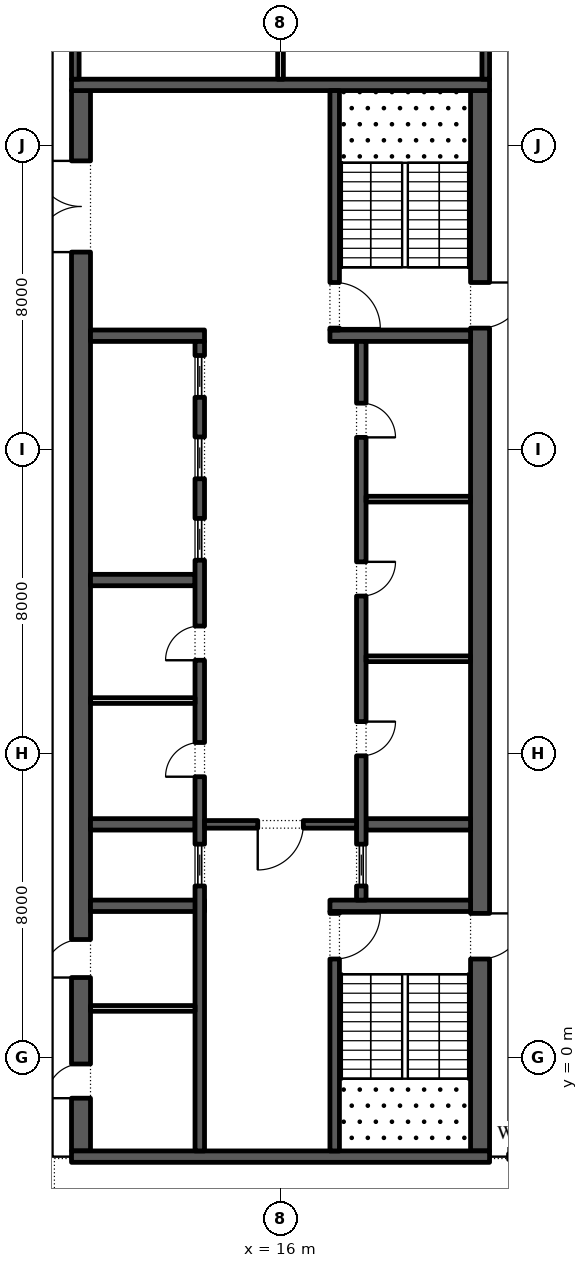
"""IFC4 building model, lengths in metres.
Left out: names, types, materials, properties, quantities, classifications, styles, units other than length and angle.
Written with IfcOpenShell. Run it as: python <this file> out.ifc"""

import sys

from ifc_helpers import new_model, si_unit, direction, frame, frame_2d, origin, place, context, subcontext, project, spatial, rectangle, extrude, element, fill, save


model = new_model("IFC4")
c1 = context("Model", 3, precision=1e-05, world=origin(), true_north=direction((0.0, 1.0)))
c2 = subcontext(c1, "Body", "Model", "MODEL_VIEW")
j1 = project(units=[si_unit("LENGTHUNIT", "METRE"), si_unit("PLANEANGLEUNIT", "RADIAN")], contexts=[c1])
p1 = place(None, origin())
s1 = spatial("IfcSite", under=j1, at=p1, CompositionType="ELEMENT")
p2 = place(p1, origin())
s2 = spatial("IfcBuilding", under=s1, at=p2, CompositionType="ELEMENT")
p3 = place(p2, frame((0.0, 0.0, 359.4)))
s3 = spatial("IfcBuildingStorey", under=s2, at=p3, CompositionType="ELEMENT", Elevation=359.4)
p4 = place(p3, frame((21.25, -2.45, 0.0), z_axis=(0.0, 0.0, 1.0), x_axis=(0.0, 1.0, 0.0)))
e1 = element("IfcWall", 1, at=p4, inside=s3, PredefinedType="SHEAR", context=c2, shape_type="SweptSolid", body=[
    extrude(rectangle(XDim=27.9, YDim=0.5, at=frame_2d((13.95, 0.0))), origin(), (0.0, 0.0, 1.0), 3.9),
])
p5 = place(p4, frame((5.05, 0.0, 0.0)))
e2 = element("IfcOpeningElement", 2, at=p5, cuts=e1, PredefinedType="OPENING", context=c2, shape_type="SweptSolid", body=[
    extrude(rectangle(XDim=1.2, YDim=2.1, at=frame_2d((0.6, 1.05))), frame((0.0, 0.26, 0.0), z_axis=(0.0, -1.0, 0.0), x_axis=(1.0, 0.0, 0.0)), (0.0, 0.0, 1.0), 0.52),
])
p6 = place(p4, frame((21.65, 0.0, 0.0)))
e3 = element("IfcOpeningElement", 3, at=p6, cuts=e1, PredefinedType="OPENING", context=c2, shape_type="SweptSolid", body=[
    extrude(rectangle(XDim=1.2, YDim=2.1, at=frame_2d((0.6, 1.05))), frame((0.0, 0.26, 0.0), z_axis=(0.0, -1.0, 0.0), x_axis=(1.0, 0.0, 0.0)), (0.0, 0.0, 1.0), 0.52),
])
p7 = place(p3, frame((10.75, -2.45, 0.0), z_axis=(0.0, 0.0, 1.0), x_axis=(0.0, 1.0, 0.0)))
e4 = element("IfcWall", 4, at=p7, inside=s3, PredefinedType="SHEAR", context=c2, shape_type="SweptSolid", body=[
    extrude(rectangle(XDim=27.9, YDim=0.5, at=frame_2d((13.95, 0.0))), origin(), (0.0, 0.0, 1.0), 3.9),
])
p8 = place(p7, frame((23.65, 0.0, 0.0)))
e5 = element("IfcOpeningElement", 5, at=p8, cuts=e4, PredefinedType="OPENING", context=c2, shape_type="SweptSolid", body=[
    extrude(rectangle(XDim=2.4, YDim=2.1, at=frame_2d((1.2, 1.05))), frame((0.0, 0.26, 0.0), z_axis=(0.0, -1.0, 0.0), x_axis=(1.0, 0.0, 0.0)), (0.0, 0.0, 1.0), 0.52),
])
p9 = place(p7, frame((1.387, 0.0, 0.0)))
e6 = element("IfcOpeningElement", 6, at=p9, cuts=e4, PredefinedType="OPENING", context=c2, shape_type="SweptSolid", body=[
    extrude(rectangle(XDim=0.9, YDim=2.1, at=frame_2d((0.45, 1.05))), frame((0.0, 0.26, 0.0), z_axis=(0.0, -1.0, 0.0), x_axis=(1.0, 0.0, 0.0)), (0.0, 0.0, 1.0), 0.52),
])
p10 = place(p7, frame((4.562, 0.0, 0.0)))
e7 = element("IfcOpeningElement", 7, at=p10, cuts=e4, PredefinedType="OPENING", context=c2, shape_type="SweptSolid", body=[
    extrude(rectangle(XDim=1.0, YDim=2.1, at=frame_2d((0.5, 1.05))), frame((0.0, 0.26, 0.0), z_axis=(0.0, -1.0, 0.0), x_axis=(1.0, 0.0, 0.0)), (0.0, 0.0, 1.0), 0.52),
])
for number, where, z_axis, x_axis in (
    (8, (10.5, -2.6, 0.0), (0.0, 0.0, 1.0), (1.0, 0.0, 0.0)),
    (9, (10.5, 25.6, 0.0), (0.0, 0.0, 1.0), (1.0, 0.0, 0.0)),
):
    element("IfcWall", number, at=place(p3, frame(where, z_axis=z_axis, x_axis=x_axis)), inside=s3, PredefinedType="SHEAR", context=c2, shape_type="SweptSolid", body=[
        extrude(rectangle(XDim=11.0, YDim=0.3, at=frame_2d((5.5, 0.0))), origin(), (0.0, 0.0, 1.0), 3.9),
    ])
p11 = place(p3, frame((17.3, 4.0, 0.0), z_axis=(0.0, 0.0, 1.0), x_axis=(1.0, 0.0, 0.0)))
e10 = element("IfcWall", 10, at=p11, inside=s3, PredefinedType="SHEAR", context=c2, shape_type="SweptSolid", body=[
    extrude(rectangle(XDim=3.7, YDim=0.3, at=frame_2d((1.85, 0.0))), origin(), (0.0, 0.0, 1.0), 3.9),
])
p12 = place(p3, frame((17.425, -2.45, 0.0), z_axis=(0.0, 0.0, 1.0), x_axis=(0.0, 1.0, 0.0)))
e11 = element("IfcWall", 11, at=p12, inside=s3, PredefinedType="SHEAR", context=c2, shape_type="SweptSolid", body=[
    extrude(rectangle(XDim=6.3, YDim=0.25, at=frame_2d((3.15, 0.0))), origin(), (0.0, 0.0, 1.0), 3.9),
])
p13 = place(p12, frame((5.05, 0.0, 0.0)))
e12 = element("IfcOpeningElement", 12, at=p13, cuts=e11, PredefinedType="OPENING", context=c2, shape_type="SweptSolid", body=[
    extrude(rectangle(XDim=1.2, YDim=2.1, at=frame_2d((0.6, 1.05))), frame((0.0, 0.135, 0.0), z_axis=(0.0, -1.0, 0.0), x_axis=(1.0, 0.0, 0.0)), (0.0, 0.0, 1.0), 0.27),
])
p14 = place(p3, frame((17.3, 19.0, 0.0), z_axis=(0.0, 0.0, 1.0), x_axis=(1.0, 0.0, 0.0)))
e13 = element("IfcWall", 13, at=p14, inside=s3, PredefinedType="SHEAR", context=c2, shape_type="SweptSolid", body=[
    extrude(rectangle(XDim=3.7, YDim=0.3, at=frame_2d((1.85, 0.0))), origin(), (0.0, 0.0, 1.0), 3.9),
])
p15 = place(p3, frame((17.425, 19.15, 0.0), z_axis=(0.0, 0.0, 1.0), x_axis=(0.0, 1.0, 0.0)))
e14 = element("IfcWall", 14, at=p15, inside=s3, PredefinedType="SHEAR", context=c2, shape_type="SweptSolid", body=[
    extrude(rectangle(XDim=6.3, YDim=0.25, at=frame_2d((3.15, 0.0))), origin(), (0.0, 0.0, 1.0), 3.9),
])
p16 = place(p15, frame((0.05, 0.0, 0.0)))
e15 = element("IfcOpeningElement", 15, at=p16, cuts=e14, PredefinedType="OPENING", context=c2, shape_type="SweptSolid", body=[
    extrude(rectangle(XDim=1.2, YDim=2.1, at=frame_2d((0.6, 1.05))), frame((0.0, 0.135, 0.0), z_axis=(0.0, -1.0, 0.0), x_axis=(1.0, 0.0, 0.0)), (0.0, 0.0, 1.0), 0.27),
])
p17 = place(p3, frame((18.25, 6.143, 0.0), z_axis=(0.0, 0.0, 1.0), x_axis=(1.0, 0.0, 0.0)))
e16 = element("IfcWall", 16, at=p17, inside=s3, PredefinedType="SHEAR", context=c2, shape_type="SweptSolid", body=[
    extrude(rectangle(XDim=2.75, YDim=0.3, at=frame_2d((1.375, 0.0))), origin(), (0.0, 0.0, 1.0), 3.9),
])
p18 = place(p3, frame((18.125, 4.15, 0.0), z_axis=(0.0, 0.0, 1.0), x_axis=(0.0, 1.0, 0.0)))
e17 = element("IfcWall", 17, at=p18, inside=s3, PredefinedType="SHEAR", context=c2, shape_type="SweptSolid", body=[
    extrude(rectangle(XDim=14.7, YDim=0.25, at=frame_2d((7.35, 0.0))), origin(), (0.0, 0.0, 1.0), 3.9),
])
p19 = place(p18, frame((3.796, 0.0, 0.0)))
e18 = element("IfcOpeningElement", 18, at=p19, cuts=e17, PredefinedType="OPENING", context=c2, shape_type="SweptSolid", body=[
    extrude(rectangle(XDim=0.9, YDim=2.1, at=frame_2d((0.45, 1.05))), frame((0.0, 0.135, 0.0), z_axis=(0.0, -1.0, 0.0), x_axis=(1.0, 0.0, 0.0)), (0.0, 0.0, 1.0), 0.27),
])
p20 = place(p18, frame((8.0, 0.0, 0.0)))
e19 = element("IfcOpeningElement", 19, at=p20, cuts=e17, PredefinedType="OPENING", context=c2, shape_type="SweptSolid", body=[
    extrude(rectangle(XDim=0.9, YDim=2.1, at=frame_2d((0.45, 1.05))), frame((0.0, 0.135, 0.0), z_axis=(0.0, -1.0, 0.0), x_axis=(1.0, 0.0, 0.0)), (0.0, 0.0, 1.0), 0.27),
])
p21 = place(p18, frame((12.175, 0.0, 0.0)))
e20 = element("IfcOpeningElement", 20, at=p21, cuts=e17, PredefinedType="OPENING", context=c2, shape_type="SweptSolid", body=[
    extrude(rectangle(XDim=0.9, YDim=2.1, at=frame_2d((0.45, 1.05))), frame((0.0, 0.135, 0.0), z_axis=(0.0, -1.0, 0.0), x_axis=(1.0, 0.0, 0.0)), (0.0, 0.0, 1.0), 0.27),
])
p22 = place(p18, frame((0.371, 0.0, 0.0)))
e21 = element("IfcOpeningElement", 21, at=p22, cuts=e17, PredefinedType="OPENING", context=c2, shape_type="SweptSolid", body=[
    extrude(rectangle(XDim=1.1, YDim=2.1, at=frame_2d((0.55, 1.05))), frame((0.0, 0.135, 0.0), z_axis=(0.0, -1.0, 0.0), x_axis=(1.0, 0.0, 0.0)), (0.0, 0.0, 1.0), 0.27),
])
for number, where, z_axis, x_axis in (
    (22, (18.25, 10.5, 0.0), (0.0, 0.0, 1.0), (1.0, 0.0, 0.0)),
    (23, (18.25, 14.7, 0.0), (0.0, 0.0, 1.0), (1.0, 0.0, 0.0)),
):
    element("IfcWall", number, at=place(p3, frame(where, z_axis=z_axis, x_axis=x_axis)), inside=s3, PredefinedType="PARTITIONING", context=c2, shape_type="SweptSolid", body=[
        extrude(rectangle(XDim=2.75, YDim=0.15, at=frame_2d((1.375, 0.0))), origin(), (0.0, 0.0, 1.0), 3.9),
    ])
p23 = place(p3, frame((11.0, 4.0, 0.0), z_axis=(0.0, 0.0, 1.0), x_axis=(1.0, 0.0, 0.0)))
e24 = element("IfcWall", 24, at=p23, inside=s3, PredefinedType="SHEAR", context=c2, shape_type="SweptSolid", body=[
    extrude(rectangle(XDim=3.0, YDim=0.3, at=frame_2d((1.5, 0.0))), origin(), (0.0, 0.0, 1.0), 3.9),
])
for number, where, z_axis, x_axis in (
    (25, (11.0, 6.143, 0.0), (0.0, 0.0, 1.0), (1.0, 0.0, 0.0)),
    (26, (11.0, 12.571, 0.0), (0.0, 0.0, 1.0), (1.0, 0.0, 0.0)),
):
    element("IfcWall", number, at=place(p3, frame(where, z_axis=z_axis, x_axis=x_axis)), inside=s3, PredefinedType="SHEAR", context=c2, shape_type="SweptSolid", body=[
        extrude(rectangle(XDim=2.75, YDim=0.3, at=frame_2d((1.375, 0.0))), origin(), (0.0, 0.0, 1.0), 3.9),
    ])
p24 = place(p3, frame((11.0, 19.0, 0.0), z_axis=(0.0, 0.0, 1.0), x_axis=(1.0, 0.0, 0.0)))
e27 = element("IfcWall", 27, at=p24, inside=s3, PredefinedType="SHEAR", context=c2, shape_type="SweptSolid", body=[
    extrude(rectangle(XDim=3.0, YDim=0.3, at=frame_2d((1.5, 0.0))), origin(), (0.0, 0.0, 1.0), 3.9),
])
p25 = place(p3, frame((13.875, -2.45, 0.0), z_axis=(0.0, 0.0, 1.0), x_axis=(0.0, 1.0, 0.0)))
e28 = element("IfcWall", 28, at=p25, inside=s3, PredefinedType="SHEAR", context=c2, shape_type="SweptSolid", body=[
    extrude(rectangle(XDim=21.3, YDim=0.25, at=frame_2d((10.65, 0.0))), origin(), (0.0, 0.0, 1.0), 3.9),
])
p26 = place(p25, frame((9.846, 0.0, 0.0)))
e29 = element("IfcOpeningElement", 29, at=p26, cuts=e28, PredefinedType="OPENING", context=c2, shape_type="SweptSolid", body=[
    extrude(rectangle(XDim=0.9, YDim=2.1, at=frame_2d((0.45, 1.05))), frame((0.0, 0.135, 0.0), z_axis=(0.0, -1.0, 0.0), x_axis=(1.0, 0.0, 0.0)), (0.0, 0.0, 1.0), 0.27),
])
p27 = place(p25, frame((12.911, 0.0, 0.0)))
e30 = element("IfcOpeningElement", 30, at=p27, cuts=e28, PredefinedType="OPENING", context=c2, shape_type="SweptSolid", body=[
    extrude(rectangle(XDim=0.9, YDim=2.1, at=frame_2d((0.45, 1.05))), frame((0.0, 0.135, 0.0), z_axis=(0.0, -1.0, 0.0), x_axis=(1.0, 0.0, 0.0)), (0.0, 0.0, 1.0), 0.27),
])
p28 = place(p25, frame((6.971, 0.0, 0.0)))
e31 = element("IfcOpeningElement", 31, at=p28, cuts=e28, PredefinedType="OPENING", context=c2, shape_type="SweptSolid", body=[
    extrude(rectangle(XDim=1.1, YDim=2.1, at=frame_2d((0.55, 1.05))), frame((0.0, 0.135, 0.0), z_axis=(0.0, -1.0, 0.0), x_axis=(1.0, 0.0, 0.0)), (0.0, 0.0, 1.0), 0.27),
])
p29 = place(p25, frame((15.543, 0.0, 0.0)))
e32 = element("IfcOpeningElement", 32, at=p29, cuts=e28, PredefinedType="OPENING", context=c2, shape_type="SweptSolid", body=[
    extrude(rectangle(XDim=1.1, YDim=2.1, at=frame_2d((0.55, 1.05))), frame((0.0, 0.135, 0.0), z_axis=(0.0, -1.0, 0.0), x_axis=(1.0, 0.0, 0.0)), (0.0, 0.0, 1.0), 0.27),
])
p30 = place(p25, frame((17.686, 0.0, 0.0)))
e33 = element("IfcOpeningElement", 33, at=p30, cuts=e28, PredefinedType="OPENING", context=c2, shape_type="SweptSolid", body=[
    extrude(rectangle(XDim=1.1, YDim=2.1, at=frame_2d((0.55, 1.05))), frame((0.0, 0.135, 0.0), z_axis=(0.0, -1.0, 0.0), x_axis=(1.0, 0.0, 0.0)), (0.0, 0.0, 1.0), 0.27),
])
p31 = place(p25, frame((19.829, 0.0, 0.0)))
e34 = element("IfcOpeningElement", 34, at=p31, cuts=e28, PredefinedType="OPENING", context=c2, shape_type="SweptSolid", body=[
    extrude(rectangle(XDim=1.1, YDim=2.1, at=frame_2d((0.55, 1.05))), frame((0.0, 0.135, 0.0), z_axis=(0.0, -1.0, 0.0), x_axis=(1.0, 0.0, 0.0)), (0.0, 0.0, 1.0), 0.27),
])
p32 = place(p3, frame((11.0, 9.4, 0.0), z_axis=(0.0, 0.0, 1.0), x_axis=(1.0, 0.0, 0.0)))
e35 = element("IfcWall", 35, at=p32, inside=s3, PredefinedType="PARTITIONING", context=c2, shape_type="SweptSolid", body=[
    extrude(rectangle(XDim=2.75, YDim=0.15, at=frame_2d((1.375, 0.0))), origin(), (0.0, 0.0, 1.0), 3.9),
])
p33 = place(p3, frame((14.0, 6.143, 0.0), z_axis=(0.0, 0.0, 1.0), x_axis=(1.0, 0.0, 0.0)))
e36 = element("IfcWall", 36, at=p33, inside=s3, PredefinedType="SHEAR", context=c2, shape_type="SweptSolid", body=[
    extrude(rectangle(XDim=4.0, YDim=0.2, at=frame_2d((2.0, 0.0))), origin(), (0.0, 0.0, 1.0), 3.9),
])
p34 = place(p33, frame((1.4, 0.0, 0.0)))
e37 = element("IfcOpeningElement", 37, at=p34, cuts=e36, PredefinedType="OPENING", context=c2, shape_type="SweptSolid", body=[
    extrude(rectangle(XDim=1.2, YDim=2.1, at=frame_2d((0.6, 1.05))), frame((0.0, 0.11, 0.0), z_axis=(0.0, -1.0, 0.0), x_axis=(1.0, 0.0, 0.0)), (0.0, 0.0, 1.0), 0.22),
])
p35 = place(p3, frame((11.0, 1.3, 0.0), z_axis=(0.0, 0.0, 1.0), x_axis=(1.0, 0.0, 0.0)))
e38 = element("IfcWall", 38, at=p35, inside=s3, PredefinedType="PARTITIONING", context=c2, shape_type="SweptSolid", body=[
    extrude(rectangle(XDim=2.75, YDim=0.15, at=frame_2d((1.375, 0.0))), origin(), (0.0, 0.0, 1.0), 3.9),
])
p36 = place(p3, frame((21.4, 25.75, 0.0), z_axis=(0.0, 0.0, 1.0), x_axis=(0.0, 1.0, 0.0)))
e39 = element("IfcWall", 39, at=p36, inside=s3, PredefinedType="SHEAR", context=c2, shape_type="SweptSolid", body=[
    extrude(rectangle(XDim=15.05, YDim=0.2, at=frame_2d((7.525, 0.0))), origin(), (0.0, 0.0, 1.0), 3.9),
])
p37 = place(p36, frame((7.075, 0.0, 0.0)))
e40 = element("IfcOpeningElement", 40, at=p37, cuts=e39, PredefinedType="OPENING", context=c2, shape_type="SweptSolid", body=[
    extrude(rectangle(XDim=0.9, YDim=2.1, at=frame_2d((0.45, 1.05))), frame((0.0, 0.11, 0.0), z_axis=(0.0, -1.0, 0.0), x_axis=(1.0, 0.0, 0.0)), (0.0, 0.0, 1.0), 0.22),
])
p38 = place(p3, frame((10.6, 25.75, 0.0), z_axis=(0.0, 0.0, 1.0), x_axis=(0.0, 1.0, 0.0)))
e41 = element("IfcWall", 41, at=p38, inside=s3, PredefinedType="SHEAR", context=c2, shape_type="SweptSolid", body=[
    extrude(rectangle(XDim=15.05, YDim=0.2, at=frame_2d((7.525, 0.0))), origin(), (0.0, 0.0, 1.0), 3.9),
])
p39 = place(p38, frame((7.075, 0.0, 0.0)))
e42 = element("IfcOpeningElement", 42, at=p39, cuts=e41, PredefinedType="OPENING", context=c2, shape_type="SweptSolid", body=[
    extrude(rectangle(XDim=0.9, YDim=2.1, at=frame_2d((0.45, 1.05))), frame((0.0, 0.11, 0.0), z_axis=(0.0, -1.0, 0.0), x_axis=(1.0, 0.0, 0.0)), (0.0, 0.0, 1.0), 0.22),
])
p40 = place(p3, frame((16.0, 25.75, 0.0), z_axis=(0.0, 0.0, 1.0), x_axis=(0.0, 1.0, 0.0)))
e43 = element("IfcWall", 43, at=p40, inside=s3, PredefinedType="PARTITIONING", context=c2, shape_type="SweptSolid", body=[
    extrude(rectangle(XDim=15.05, YDim=0.15, at=frame_2d((7.525, 0.0))), origin(), (0.0, 0.0, 1.0), 3.9),
])
p41 = place(p19, frame((0.9, -0.2, 0.0), z_axis=(0.0, 0.0, 1.0), x_axis=(-1.0, 0.0, 0.0)))
e44 = element("IfcDoor", 44, at=p41, inside=s3, OperationType="SINGLE_SWING_RIGHT", PredefinedType="DOOR", context=c2, shape_type="SweptSolid", body=[
    extrude(rectangle(XDim=0.9, YDim=2.1, at=frame_2d((0.45, 1.05))), frame((0.0, -0.075, 0.0), z_axis=(0.0, -1.0, 0.0), x_axis=(1.0, 0.0, 0.0)), (0.0, 0.0, 1.0), 0.05),
])
fill(e18, e44)
p42 = place(p20, frame((0.9, -0.2, 0.0), z_axis=(0.0, 0.0, 1.0), x_axis=(-1.0, 0.0, 0.0)))
e45 = element("IfcDoor", 45, at=p42, inside=s3, OperationType="SINGLE_SWING_RIGHT", PredefinedType="DOOR", context=c2, shape_type="SweptSolid", body=[
    extrude(rectangle(XDim=0.9, YDim=2.1, at=frame_2d((0.45, 1.05))), frame((0.0, -0.075, 0.0), z_axis=(0.0, -1.0, 0.0), x_axis=(1.0, 0.0, 0.0)), (0.0, 0.0, 1.0), 0.05),
])
fill(e19, e45)
p43 = place(p21, frame((0.9, -0.2, 0.0), z_axis=(0.0, 0.0, 1.0), x_axis=(-1.0, 0.0, 0.0)))
e46 = element("IfcDoor", 46, at=p43, inside=s3, OperationType="SINGLE_SWING_LEFT", PredefinedType="DOOR", context=c2, shape_type="SweptSolid", body=[
    extrude(rectangle(XDim=0.9, YDim=2.1, at=frame_2d((0.45, 1.05))), frame((0.0, -0.075, 0.0), z_axis=(0.0, -1.0, 0.0), x_axis=(1.0, 0.0, 0.0)), (0.0, 0.0, 1.0), 0.05),
])
fill(e20, e46)
p44 = place(p22, origin())
e47 = element("IfcDoor", 47, at=p44, inside=s3, OperationType="SLIDING_TO_LEFT", PredefinedType="DOOR", context=c2, shape_type="SweptSolid", body=[
    extrude(rectangle(XDim=1.1, YDim=2.1, at=frame_2d((0.55, 1.05))), frame((0.0, 0.025, 0.0), z_axis=(0.0, -1.0, 0.0), x_axis=(1.0, 0.0, 0.0)), (0.0, 0.0, 1.0), 0.05),
])
fill(e21, e47)
p45 = place(p26, origin())
e48 = element("IfcDoor", 48, at=p45, inside=s3, OperationType="SINGLE_SWING_RIGHT", PredefinedType="DOOR", context=c2, shape_type="SweptSolid", body=[
    extrude(rectangle(XDim=0.9, YDim=2.1, at=frame_2d((0.45, 1.05))), frame((0.0, 0.125, 0.0), z_axis=(0.0, -1.0, 0.0), x_axis=(1.0, 0.0, 0.0)), (0.0, 0.0, 1.0), 0.05),
])
fill(e29, e48)
p46 = place(p27, origin())
e49 = element("IfcDoor", 49, at=p46, inside=s3, OperationType="SINGLE_SWING_RIGHT", PredefinedType="DOOR", context=c2, shape_type="SweptSolid", body=[
    extrude(rectangle(XDim=0.9, YDim=2.1, at=frame_2d((0.45, 1.05))), frame((0.0, 0.125, 0.0), z_axis=(0.0, -1.0, 0.0), x_axis=(1.0, 0.0, 0.0)), (0.0, 0.0, 1.0), 0.05),
])
fill(e30, e49)
p47 = place(p28, origin())
e50 = element("IfcDoor", 50, at=p47, inside=s3, OperationType="SLIDING_TO_LEFT", PredefinedType="DOOR", context=c2, shape_type="SweptSolid", body=[
    extrude(rectangle(XDim=1.1, YDim=2.1, at=frame_2d((0.55, 1.05))), frame((0.0, 0.025, 0.0), z_axis=(0.0, -1.0, 0.0), x_axis=(1.0, 0.0, 0.0)), (0.0, 0.0, 1.0), 0.05),
])
fill(e31, e50)
p48 = place(p29, origin())
e51 = element("IfcDoor", 51, at=p48, inside=s3, OperationType="SLIDING_TO_LEFT", PredefinedType="DOOR", context=c2, shape_type="SweptSolid", body=[
    extrude(rectangle(XDim=1.1, YDim=2.1, at=frame_2d((0.55, 1.05))), frame((0.0, 0.025, 0.0), z_axis=(0.0, -1.0, 0.0), x_axis=(1.0, 0.0, 0.0)), (0.0, 0.0, 1.0), 0.05),
])
fill(e32, e51)
p49 = place(p30, origin())
e52 = element("IfcDoor", 52, at=p49, inside=s3, OperationType="SLIDING_TO_LEFT", PredefinedType="DOOR", context=c2, shape_type="SweptSolid", body=[
    extrude(rectangle(XDim=1.1, YDim=2.1, at=frame_2d((0.55, 1.05))), frame((0.0, 0.025, 0.0), z_axis=(0.0, -1.0, 0.0), x_axis=(1.0, 0.0, 0.0)), (0.0, 0.0, 1.0), 0.05),
])
fill(e33, e52)
p50 = place(p31, origin())
e53 = element("IfcDoor", 53, at=p50, inside=s3, OperationType="SLIDING_TO_LEFT", PredefinedType="DOOR", context=c2, shape_type="SweptSolid", body=[
    extrude(rectangle(XDim=1.1, YDim=2.1, at=frame_2d((0.55, 1.05))), frame((0.0, 0.025, 0.0), z_axis=(0.0, -1.0, 0.0), x_axis=(1.0, 0.0, 0.0)), (0.0, 0.0, 1.0), 0.05),
])
fill(e34, e53)
p51 = place(p34, frame((1.2, 0.0, 0.0), z_axis=(0.0, 0.0, 1.0), x_axis=(-1.0, 0.0, 0.0)))
e54 = element("IfcDoor", 54, at=p51, inside=s3, OperationType="SINGLE_SWING_LEFT", PredefinedType="DOOR", context=c2, shape_type="SweptSolid", body=[
    extrude(rectangle(XDim=1.2, YDim=2.1, at=frame_2d((0.6, 1.05))), frame((0.0, 0.025, 0.0), z_axis=(0.0, -1.0, 0.0), x_axis=(1.0, 0.0, 0.0)), (0.0, 0.0, 1.0), 0.05),
])
fill(e37, e54)
p52 = place(p8, origin())
e55 = element("IfcDoor", 55, at=p52, inside=s3, OperationType="DOUBLE_DOOR_SINGLE_SWING", PredefinedType="DOOR", context=c2, shape_type="SweptSolid", body=[
    extrude(rectangle(XDim=2.4, YDim=2.1, at=frame_2d((1.2, 1.05))), frame((0.0, 0.025, 0.0), z_axis=(0.0, -1.0, 0.0), x_axis=(1.0, 0.0, 0.0)), (0.0, 0.0, 1.0), 0.05),
])
fill(e5, e55)
p53 = place(p13, frame((1.2, 0.0, 0.0), z_axis=(0.0, 0.0, 1.0), x_axis=(-1.0, 0.0, 0.0)))
e56 = element("IfcDoor", 56, at=p53, inside=s3, OperationType="SINGLE_SWING_RIGHT", PredefinedType="DOOR", context=c2, shape_type="SweptSolid", body=[
    extrude(rectangle(XDim=1.2, YDim=2.1, at=frame_2d((0.6, 1.05))), frame((0.0, 0.025, 0.0), z_axis=(0.0, -1.0, 0.0), x_axis=(1.0, 0.0, 0.0)), (0.0, 0.0, 1.0), 0.05),
])
fill(e12, e56)
p54 = place(p5, frame((1.2, 0.0, 0.0), z_axis=(0.0, 0.0, 1.0), x_axis=(-1.0, 0.0, 0.0)))
e57 = element("IfcDoor", 57, at=p54, inside=s3, OperationType="SINGLE_SWING_RIGHT", PredefinedType="DOOR", context=c2, shape_type="SweptSolid", body=[
    extrude(rectangle(XDim=1.2, YDim=2.1, at=frame_2d((0.6, 1.05))), frame((0.0, 0.025, 0.0), z_axis=(0.0, -1.0, 0.0), x_axis=(1.0, 0.0, 0.0)), (0.0, 0.0, 1.0), 0.05),
])
fill(e2, e57)
p55 = place(p16, frame((1.2, 0.0, 0.0), z_axis=(0.0, 0.0, 1.0), x_axis=(-1.0, 0.0, 0.0)))
e58 = element("IfcDoor", 58, at=p55, inside=s3, OperationType="SINGLE_SWING_LEFT", PredefinedType="DOOR", context=c2, shape_type="SweptSolid", body=[
    extrude(rectangle(XDim=1.2, YDim=2.1, at=frame_2d((0.6, 1.05))), frame((0.0, 0.025, 0.0), z_axis=(0.0, -1.0, 0.0), x_axis=(1.0, 0.0, 0.0)), (0.0, 0.0, 1.0), 0.05),
])
fill(e15, e58)
p56 = place(p6, frame((1.2, 0.0, 0.0), z_axis=(0.0, 0.0, 1.0), x_axis=(-1.0, 0.0, 0.0)))
e59 = element("IfcDoor", 59, at=p56, inside=s3, OperationType="SINGLE_SWING_RIGHT", PredefinedType="DOOR", context=c2, shape_type="SweptSolid", body=[
    extrude(rectangle(XDim=1.2, YDim=2.1, at=frame_2d((0.6, 1.05))), frame((0.0, 0.025, 0.0), z_axis=(0.0, -1.0, 0.0), x_axis=(1.0, 0.0, 0.0)), (0.0, 0.0, 1.0), 0.05),
])
fill(e3, e59)
p57 = place(p9, origin())
e60 = element("IfcDoor", 60, at=p57, inside=s3, OperationType="SINGLE_SWING_RIGHT", PredefinedType="DOOR", context=c2, shape_type="SweptSolid", body=[
    extrude(rectangle(XDim=0.9, YDim=2.1, at=frame_2d((0.45, 1.05))), frame((0.0, -0.2, 0.0), z_axis=(0.0, -1.0, 0.0), x_axis=(1.0, 0.0, 0.0)), (0.0, 0.0, 1.0), 0.05),
])
fill(e6, e60)
p58 = place(p10, origin())
e61 = element("IfcDoor", 61, at=p58, inside=s3, OperationType="SINGLE_SWING_RIGHT", PredefinedType="DOOR", context=c2, shape_type="SweptSolid", body=[
    extrude(rectangle(XDim=1.0, YDim=2.1, at=frame_2d((0.5, 1.05))), frame((0.0, -0.2, 0.0), z_axis=(0.0, -1.0, 0.0), x_axis=(1.0, 0.0, 0.0)), (0.0, 0.0, 1.0), 0.05),
])
fill(e7, e61)
save(model, sys.argv[1])
